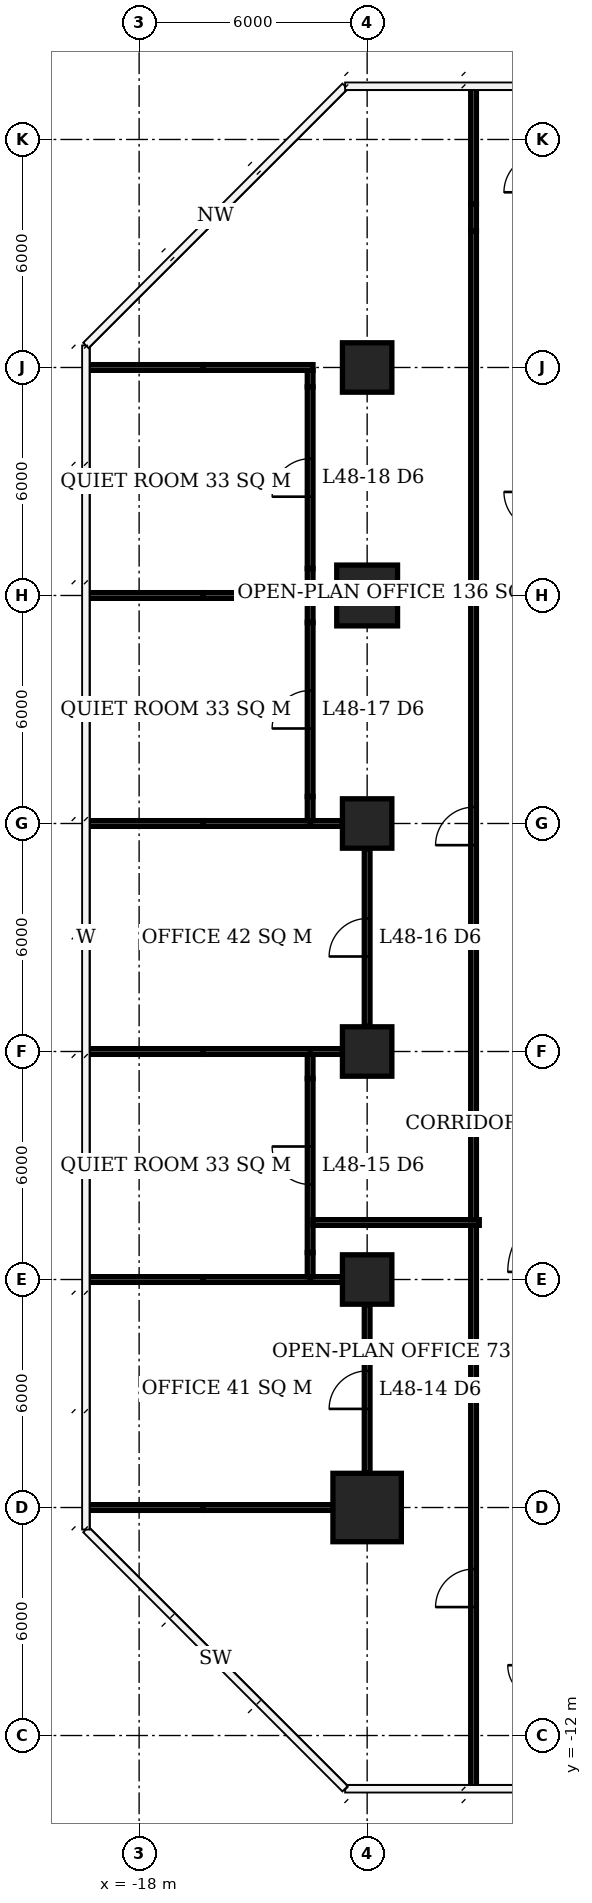
"""IFC4 building model, lengths in metres.
Left out: names, types, materials, properties, quantities, classifications, styles, units other than length and angle.
Written with IfcOpenShell. Run it as: python <this file> out.ifc"""

import sys

from ifc_helpers import new_model, si_unit, direction, frame, frame_2d, origin, origin_2d, place, context, subcontext, project, spatial, rectangle, extrude, element, fill, save


model = new_model("IFC4")
c1 = context("Model", 3, precision=1e-05, world=origin(), true_north=direction((0.0, 1.0)))
c2 = subcontext(c1, "Body", "Model", "MODEL_VIEW")
j1 = project(units=[si_unit("LENGTHUNIT", "METRE"), si_unit("PLANEANGLEUNIT", "RADIAN")], contexts=[c1])
p1 = place(None, origin())
s1 = spatial("IfcSite", under=j1, at=p1, CompositionType="ELEMENT")
p2 = place(p1, origin())
s2 = spatial("IfcBuilding", under=s1, at=p2, CompositionType="ELEMENT")
p3 = place(p2, frame((0.0, 0.0, 196.7)))
s3 = spatial("IfcBuildingStorey", under=s2, at=p3, CompositionType="ELEMENT", Elevation=196.7)
p4 = place(p3, frame((-12.0, -6.0, 0.0), z_axis=(0.0, 0.0, 1.0), x_axis=(1.0, 0.0, 0.0)))
e1 = element("IfcColumn", 1, at=p4, inside=s3, PredefinedType="COLUMN", context=c2, shape_type="SweptSolid", body=[
    extrude(rectangle(XDim=1.8, YDim=1.8, at=origin_2d()), origin(), (0.0, 0.0, 1.0), 3.9),
])
for number, where, z_axis, x_axis in (
    (2, (-12.0, 0.0, 0.0), (0.0, 0.0, 1.0), (1.0, 0.0, 0.0)),
    (3, (-12.0, 6.0, 0.0), (0.0, 0.0, 1.0), (1.0, 0.0, 0.0)),
    (4, (-12.0, 12.0, 0.0), (0.0, 0.0, 1.0), (1.0, 0.0, 0.0)),
):
    element("IfcColumn", number, at=place(p3, frame(where, z_axis=z_axis, x_axis=x_axis)), inside=s3, PredefinedType="COLUMN", context=c2, shape_type="SweptSolid", body=[
        extrude(rectangle(XDim=1.3, YDim=1.3, at=origin_2d()), origin(), (0.0, 0.0, 1.0), 3.9),
    ])
p5 = place(p3, frame((-12.0, 18.0, 0.0), z_axis=(0.0, 0.0, 1.0), x_axis=(1.0, 0.0, 0.0)))
e5 = element("IfcColumn", 5, at=p5, inside=s3, PredefinedType="COLUMN", context=c2, shape_type="SweptSolid", body=[
    extrude(rectangle(XDim=1.6, YDim=1.6, at=origin_2d()), origin(), (0.0, 0.0, 1.0), 3.9),
])
p6 = place(p3, frame((-12.0, 24.0, 0.0), z_axis=(0.0, 0.0, 1.0), x_axis=(1.0, 0.0, 0.0)))
e6 = element("IfcColumn", 6, at=p6, inside=s3, PredefinedType="COLUMN", context=c2, shape_type="SweptSolid", body=[
    extrude(rectangle(XDim=1.3, YDim=1.3, at=origin_2d()), origin(), (0.0, 0.0, 1.0), 3.9),
])
p7 = place(p3, frame((-19.4, -6.0, 0.0), z_axis=(0.0, 0.0, 1.0), x_axis=(1.0, 0.0, 0.0)))
e7 = element("IfcWall", 7, at=p7, inside=s3, PredefinedType="PARTITIONING", context=c2, shape_type="SweptSolid", body=[
    extrude(rectangle(XDim=3.09, YDim=0.15, at=frame_2d((1.545, 0.0))), origin(), (0.0, 0.0, 1.0), 3.65),
])
p8 = place(p3, frame((-16.31, -6.0, 0.0), z_axis=(0.0, 0.0, 1.0), x_axis=(1.0, 0.0, 0.0)))
e8 = element("IfcWall", 8, at=p8, inside=s3, PredefinedType="PARTITIONING", context=c2, shape_type="SweptSolid", body=[
    extrude(rectangle(XDim=3.41, YDim=0.15, at=frame_2d((1.705, 0.0))), origin(), (0.0, 0.0, 1.0), 2.65),
])
p9 = place(p3, frame((-19.4, 0.0, 0.0), z_axis=(0.0, 0.0, 1.0), x_axis=(1.0, 0.0, 0.0)))
e9 = element("IfcWall", 9, at=p9, inside=s3, PredefinedType="PARTITIONING", context=c2, shape_type="SweptSolid", body=[
    extrude(rectangle(XDim=3.09, YDim=0.15, at=frame_2d((1.545, 0.0))), origin(), (0.0, 0.0, 1.0), 3.65),
])
p10 = place(p3, frame((-16.31, 0.0, 0.0), z_axis=(0.0, 0.0, 1.0), x_axis=(1.0, 0.0, 0.0)))
e10 = element("IfcWall", 10, at=p10, inside=s3, PredefinedType="PARTITIONING", context=c2, shape_type="SweptSolid", body=[
    extrude(rectangle(XDim=2.885, YDim=0.15, at=frame_2d((1.442, 0.0))), origin(), (0.0, 0.0, 1.0), 2.65),
])
p11 = place(p3, frame((-13.5, 0.0, 0.0), z_axis=(0.0, 0.0, 1.0), x_axis=(1.0, 0.0, 0.0)))
e11 = element("IfcWall", 11, at=p11, inside=s3, PredefinedType="PARTITIONING", context=c2, shape_type="SweptSolid", body=[
    extrude(rectangle(XDim=0.85, YDim=0.15, at=frame_2d((0.425, 0.0))), origin(), (0.0, 0.0, 1.0), 2.65),
])
p12 = place(p3, frame((-19.35, 6.0, 0.0), z_axis=(0.0, 0.0, 1.0), x_axis=(1.0, 0.0, 0.0)))
e12 = element("IfcWall", 12, at=p12, inside=s3, PredefinedType="PARTITIONING", context=c2, shape_type="SweptSolid", body=[
    extrude(rectangle(XDim=3.04, YDim=0.15, at=frame_2d((1.52, 0.0))), origin(), (0.0, 0.0, 1.0), 3.65),
])
p13 = place(p3, frame((-16.31, 6.0, 0.0), z_axis=(0.0, 0.0, 1.0), x_axis=(1.0, 0.0, 0.0)))
e13 = element("IfcWall", 13, at=p13, inside=s3, PredefinedType="PARTITIONING", context=c2, shape_type="SweptSolid", body=[
    extrude(rectangle(XDim=2.885, YDim=0.15, at=frame_2d((1.442, 0.0))), origin(), (0.0, 0.0, 1.0), 2.65),
])
p14 = place(p3, frame((-13.5, 6.0, 0.0), z_axis=(0.0, 0.0, 1.0), x_axis=(1.0, 0.0, 0.0)))
e14 = element("IfcWall", 14, at=p14, inside=s3, PredefinedType="PARTITIONING", context=c2, shape_type="SweptSolid", body=[
    extrude(rectangle(XDim=0.85, YDim=0.15, at=frame_2d((0.425, 0.0))), origin(), (0.0, 0.0, 1.0), 2.65),
])
p15 = place(p3, frame((-19.35, 12.0, 0.0), z_axis=(0.0, 0.0, 1.0), x_axis=(1.0, 0.0, 0.0)))
e15 = element("IfcWall", 15, at=p15, inside=s3, PredefinedType="PARTITIONING", context=c2, shape_type="SweptSolid", body=[
    extrude(rectangle(XDim=3.04, YDim=0.15, at=frame_2d((1.52, 0.0))), origin(), (0.0, 0.0, 1.0), 3.65),
])
p16 = place(p3, frame((-16.31, 12.0, 0.0), z_axis=(0.0, 0.0, 1.0), x_axis=(1.0, 0.0, 0.0)))
e16 = element("IfcWall", 16, at=p16, inside=s3, PredefinedType="PARTITIONING", context=c2, shape_type="SweptSolid", body=[
    extrude(rectangle(XDim=2.885, YDim=0.15, at=frame_2d((1.442, 0.0))), origin(), (0.0, 0.0, 1.0), 2.65),
])
p17 = place(p3, frame((-13.5, 12.0, 0.0), z_axis=(0.0, 0.0, 1.0), x_axis=(1.0, 0.0, 0.0)))
e17 = element("IfcWall", 17, at=p17, inside=s3, PredefinedType="PARTITIONING", context=c2, shape_type="SweptSolid", body=[
    extrude(rectangle(XDim=0.85, YDim=0.15, at=frame_2d((0.425, 0.0))), origin(), (0.0, 0.0, 1.0), 2.65),
])
p18 = place(p3, frame((-19.4, 18.0, 0.0), z_axis=(0.0, 0.0, 1.0), x_axis=(1.0, 0.0, 0.0)))
e18 = element("IfcWall", 18, at=p18, inside=s3, PredefinedType="PARTITIONING", context=c2, shape_type="SweptSolid", body=[
    extrude(rectangle(XDim=3.09, YDim=0.15, at=frame_2d((1.545, 0.0))), origin(), (0.0, 0.0, 1.0), 3.65),
])
p19 = place(p3, frame((-16.31, 18.0, 0.0), z_axis=(0.0, 0.0, 1.0), x_axis=(1.0, 0.0, 0.0)))
e19 = element("IfcWall", 19, at=p19, inside=s3, PredefinedType="PARTITIONING", context=c2, shape_type="SweptSolid", body=[
    extrude(rectangle(XDim=2.96, YDim=0.15, at=frame_2d((1.48, 0.0))), origin(), (0.0, 0.0, 1.0), 2.65),
])
p20 = place(p3, frame((-19.4, 24.0, 0.0), z_axis=(0.0, 0.0, 1.0), x_axis=(1.0, 0.0, 0.0)))
e20 = element("IfcWall", 20, at=p20, inside=s3, PredefinedType="PARTITIONING", context=c2, shape_type="SweptSolid", body=[
    extrude(rectangle(XDim=3.09, YDim=0.15, at=frame_2d((1.545, 0.0))), origin(), (0.0, 0.0, 1.0), 3.65),
])
p21 = place(p3, frame((-16.31, 24.0, 0.0), z_axis=(0.0, 0.0, 1.0), x_axis=(1.0, 0.0, 0.0)))
e21 = element("IfcWall", 21, at=p21, inside=s3, PredefinedType="PARTITIONING", context=c2, shape_type="SweptSolid", body=[
    extrude(rectangle(XDim=2.885, YDim=0.15, at=frame_2d((1.442, 0.0))), origin(), (0.0, 0.0, 1.0), 2.65),
])
p22 = place(p3, frame((-13.5, 0.075, 0.0), z_axis=(0.0, 0.0, 1.0), x_axis=(0.0, 1.0, 0.0)))
e22 = element("IfcWall", 22, at=p22, inside=s3, PredefinedType="PARTITIONING", context=c2, shape_type="SweptSolid", body=[
    extrude(rectangle(XDim=0.635, YDim=0.15, at=frame_2d((0.317, 0.0))), origin(), (0.0, 0.0, 1.0), 2.65),
])
p23 = place(p3, frame((-13.5, 0.71, 0.0), z_axis=(0.0, 0.0, 1.0), x_axis=(0.0, 1.0, 0.0)))
e23 = element("IfcWall", 23, at=p23, inside=s3, PredefinedType="PARTITIONING", context=c2, shape_type="SweptSolid", body=[
    extrude(rectangle(XDim=4.58, YDim=0.15, at=frame_2d((2.29, 0.0))), origin(), (0.0, 0.0, 1.0), 3.65),
])
p24 = place(p23, frame((1.79, 0.0, 0.0)))
e24 = element("IfcOpeningElement", 24, at=p24, cuts=e23, PredefinedType="OPENING", context=c2, shape_type="SweptSolid", body=[
    extrude(rectangle(XDim=1.0, YDim=2.1, at=frame_2d((0.5, 1.05))), frame((0.0, 0.085, 0.0), z_axis=(0.0, -1.0, 0.0), x_axis=(1.0, 0.0, 0.0)), (0.0, 0.0, 1.0), 0.17),
])
for number, where, z_axis, x_axis in (
    (25, (-13.5, 5.29, 0.0), (0.0, 0.0, 1.0), (0.0, 1.0, 0.0)),
    (26, (-13.5, 12.075, 0.0), (0.0, 0.0, 1.0), (0.0, 1.0, 0.0)),
):
    element("IfcWall", number, at=place(p3, frame(where, z_axis=z_axis, x_axis=x_axis)), inside=s3, PredefinedType="PARTITIONING", context=c2, shape_type="SweptSolid", body=[
        extrude(rectangle(XDim=0.635, YDim=0.15, at=frame_2d((0.317, 0.0))), origin(), (0.0, 0.0, 1.0), 2.65),
    ])
p25 = place(p3, frame((-13.5, 12.71, 0.0), z_axis=(0.0, 0.0, 1.0), x_axis=(0.0, 1.0, 0.0)))
e27 = element("IfcWall", 27, at=p25, inside=s3, PredefinedType="PARTITIONING", context=c2, shape_type="SweptSolid", body=[
    extrude(rectangle(XDim=4.58, YDim=0.15, at=frame_2d((2.29, 0.0))), origin(), (0.0, 0.0, 1.0), 3.65),
])
p26 = place(p25, frame((1.79, 0.0, 0.0)))
e28 = element("IfcOpeningElement", 28, at=p26, cuts=e27, PredefinedType="OPENING", context=c2, shape_type="SweptSolid", body=[
    extrude(rectangle(XDim=1.0, YDim=2.1, at=frame_2d((0.5, 1.05))), frame((0.0, 0.085, 0.0), z_axis=(0.0, -1.0, 0.0), x_axis=(1.0, 0.0, 0.0)), (0.0, 0.0, 1.0), 0.17),
])
for number, where, z_axis, x_axis in (
    (29, (-13.5, 17.29, 0.0), (0.0, 0.0, 1.0), (0.0, 1.0, 0.0)),
    (30, (-13.5, 18.075, 0.0), (0.0, 0.0, 1.0), (0.0, 1.0, 0.0)),
):
    element("IfcWall", number, at=place(p3, frame(where, z_axis=z_axis, x_axis=x_axis)), inside=s3, PredefinedType="PARTITIONING", context=c2, shape_type="SweptSolid", body=[
        extrude(rectangle(XDim=0.635, YDim=0.15, at=frame_2d((0.317, 0.0))), origin(), (0.0, 0.0, 1.0), 2.65),
    ])
p27 = place(p3, frame((-13.5, 18.71, 0.0), z_axis=(0.0, 0.0, 1.0), x_axis=(0.0, 1.0, 0.0)))
e31 = element("IfcWall", 31, at=p27, inside=s3, PredefinedType="PARTITIONING", context=c2, shape_type="SweptSolid", body=[
    extrude(rectangle(XDim=4.78, YDim=0.15, at=frame_2d((2.39, 0.0))), origin(), (0.0, 0.0, 1.0), 3.65),
])
p28 = place(p27, frame((1.89, 0.0, 0.0)))
e32 = element("IfcOpeningElement", 32, at=p28, cuts=e31, PredefinedType="OPENING", context=c2, shape_type="SweptSolid", body=[
    extrude(rectangle(XDim=1.0, YDim=2.1, at=frame_2d((0.5, 1.05))), frame((0.0, 0.085, 0.0), z_axis=(0.0, -1.0, 0.0), x_axis=(1.0, 0.0, 0.0)), (0.0, 0.0, 1.0), 0.17),
])
p29 = place(p3, frame((-13.5, 23.49, 0.0), z_axis=(0.0, 0.0, 1.0), x_axis=(0.0, 1.0, 0.0)))
e33 = element("IfcWall", 33, at=p29, inside=s3, PredefinedType="PARTITIONING", context=c2, shape_type="SweptSolid", body=[
    extrude(rectangle(XDim=0.435, YDim=0.15, at=frame_2d((0.218, 0.0))), origin(), (0.0, 0.0, 1.0), 2.65),
])
p30 = place(p3, frame((-12.0, -5.1, 0.0), z_axis=(0.0, 0.0, 1.0), x_axis=(0.0, 1.0, 0.0)))
e34 = element("IfcWall", 34, at=p30, inside=s3, PredefinedType="PARTITIONING", context=c2, shape_type="SweptSolid", body=[
    extrude(rectangle(XDim=4.44, YDim=0.15, at=frame_2d((2.22, 0.0))), origin(), (0.0, 0.0, 1.0), 3.65),
])
p31 = place(p30, frame((1.695, 0.0, 0.0)))
e35 = element("IfcOpeningElement", 35, at=p31, cuts=e34, PredefinedType="OPENING", context=c2, shape_type="SweptSolid", body=[
    extrude(rectangle(XDim=1.0, YDim=2.1, at=frame_2d((0.5, 1.05))), frame((0.0, 0.085, 0.0), z_axis=(0.0, -1.0, 0.0), x_axis=(1.0, 0.0, 0.0)), (0.0, 0.0, 1.0), 0.17),
])
p32 = place(p3, frame((-12.0, 6.66, 0.0), z_axis=(0.0, 0.0, 1.0), x_axis=(0.0, 1.0, 0.0)))
e36 = element("IfcWall", 36, at=p32, inside=s3, PredefinedType="PARTITIONING", context=c2, shape_type="SweptSolid", body=[
    extrude(rectangle(XDim=4.68, YDim=0.15, at=frame_2d((2.34, 0.0))), origin(), (0.0, 0.0, 1.0), 3.65),
])
p33 = place(p32, frame((1.84, 0.0, 0.0)))
e37 = element("IfcOpeningElement", 37, at=p33, cuts=e36, PredefinedType="OPENING", context=c2, shape_type="SweptSolid", body=[
    extrude(rectangle(XDim=1.0, YDim=2.1, at=frame_2d((0.5, 1.05))), frame((0.0, 0.085, 0.0), z_axis=(0.0, -1.0, 0.0), x_axis=(1.0, 0.0, 0.0)), (0.0, 0.0, 1.0), 0.17),
])
p34 = place(p3, frame((-13.425, 1.5, 0.0), z_axis=(0.0, 0.0, 1.0), x_axis=(1.0, 0.0, 0.0)))
e38 = element("IfcWall", 38, at=p34, inside=s3, PredefinedType="PARTITIONING", context=c2, shape_type="SweptSolid", body=[
    extrude(rectangle(XDim=4.375, YDim=0.15, at=frame_2d((2.188, 0.0))), origin(), (0.0, 0.0, 1.0), 3.65),
])
p35 = place(p3, frame((-9.2, -13.4, 0.0), z_axis=(0.0, 0.0, 1.0), x_axis=(0.0, 1.0, 0.0)))
e39 = element("IfcWall", 39, at=p35, inside=s3, PredefinedType="PARTITIONING", context=c2, shape_type="SweptSolid", body=[
    extrude(rectangle(XDim=14.825, YDim=0.15, at=frame_2d((7.413, 0.0))), origin(), (0.0, 0.0, 1.0), 3.65),
])
p36 = place(p35, frame((4.78, 0.0, 0.0)))
e40 = element("IfcOpeningElement", 40, at=p36, cuts=e39, PredefinedType="OPENING", context=c2, shape_type="SweptSolid", body=[
    extrude(rectangle(XDim=1.0, YDim=2.1, at=frame_2d((0.5, 1.05))), frame((0.0, 0.085, 0.0), z_axis=(0.0, -1.0, 0.0), x_axis=(1.0, 0.0, 0.0)), (0.0, 0.0, 1.0), 0.17),
])
p37 = place(p3, frame((-9.2, 1.575, 0.0), z_axis=(0.0, 0.0, 1.0), x_axis=(0.0, 1.0, 0.0)))
e41 = element("IfcWall", 41, at=p37, inside=s3, PredefinedType="PARTITIONING", context=c2, shape_type="SweptSolid", body=[
    extrude(rectangle(XDim=26.015, YDim=0.15, at=frame_2d((13.008, 0.0))), origin(), (0.0, 0.0, 1.0), 3.65),
])
p38 = place(p37, frame((9.855, 0.0, 0.0)))
e42 = element("IfcOpeningElement", 42, at=p38, cuts=e41, PredefinedType="OPENING", context=c2, shape_type="SweptSolid", body=[
    extrude(rectangle(XDim=1.0, YDim=2.1, at=frame_2d((0.5, 1.05))), frame((0.0, 0.085, 0.0), z_axis=(0.0, -1.0, 0.0), x_axis=(1.0, 0.0, 0.0)), (0.0, 0.0, 1.0), 0.17),
])
p39 = place(p3, frame((-9.2, 27.59, 0.0), z_axis=(0.0, 0.0, 1.0), x_axis=(0.0, 1.0, 0.0)))
e43 = element("IfcWall", 43, at=p39, inside=s3, PredefinedType="PARTITIONING", context=c2, shape_type="SweptSolid", body=[
    extrude(rectangle(XDim=0.72, YDim=0.15, at=frame_2d((0.36, 0.0))), origin(), (0.0, 0.0, 1.0), 2.65),
])
p40 = place(p3, frame((-9.2, 28.31, 0.0), z_axis=(0.0, 0.0, 1.0), x_axis=(0.0, 1.0, 0.0)))
e44 = element("IfcWall", 44, at=p40, inside=s3, PredefinedType="PARTITIONING", context=c2, shape_type="SweptSolid", body=[
    extrude(rectangle(XDim=3.09, YDim=0.15, at=frame_2d((1.545, 0.0))), origin(), (0.0, 0.0, 1.0), 3.65),
])
p41 = place(p31, origin())
e45 = element("IfcDoor", 45, at=p41, inside=s3, OperationType="SINGLE_SWING_LEFT", PredefinedType="DOOR", context=c2, shape_type="SweptSolid", body=[
    extrude(rectangle(XDim=1.0, YDim=2.1, at=frame_2d((0.5, 1.05))), frame((0.0, 0.025, 0.0), z_axis=(0.0, -1.0, 0.0), x_axis=(1.0, 0.0, 0.0)), (0.0, 0.0, 1.0), 0.05),
])
fill(e35, e45)
p42 = place(p24, origin())
e46 = element("IfcDoor", 46, at=p42, inside=s3, OperationType="SINGLE_SWING_RIGHT", PredefinedType="DOOR", context=c2, shape_type="SweptSolid", body=[
    extrude(rectangle(XDim=1.0, YDim=2.1, at=frame_2d((0.5, 1.05))), frame((0.0, 0.025, 0.0), z_axis=(0.0, -1.0, 0.0), x_axis=(1.0, 0.0, 0.0)), (0.0, 0.0, 1.0), 0.05),
])
fill(e24, e46)
p43 = place(p33, origin())
e47 = element("IfcDoor", 47, at=p43, inside=s3, OperationType="SINGLE_SWING_LEFT", PredefinedType="DOOR", context=c2, shape_type="SweptSolid", body=[
    extrude(rectangle(XDim=1.0, YDim=2.1, at=frame_2d((0.5, 1.05))), frame((0.0, 0.025, 0.0), z_axis=(0.0, -1.0, 0.0), x_axis=(1.0, 0.0, 0.0)), (0.0, 0.0, 1.0), 0.05),
])
fill(e37, e47)
p44 = place(p26, origin())
e48 = element("IfcDoor", 48, at=p44, inside=s3, OperationType="SINGLE_SWING_LEFT", PredefinedType="DOOR", context=c2, shape_type="SweptSolid", body=[
    extrude(rectangle(XDim=1.0, YDim=2.1, at=frame_2d((0.5, 1.05))), frame((0.0, 0.025, 0.0), z_axis=(0.0, -1.0, 0.0), x_axis=(1.0, 0.0, 0.0)), (0.0, 0.0, 1.0), 0.05),
])
fill(e28, e48)
p45 = place(p28, origin())
e49 = element("IfcDoor", 49, at=p45, inside=s3, OperationType="SINGLE_SWING_LEFT", PredefinedType="DOOR", context=c2, shape_type="SweptSolid", body=[
    extrude(rectangle(XDim=1.0, YDim=2.1, at=frame_2d((0.5, 1.05))), frame((0.0, 0.025, 0.0), z_axis=(0.0, -1.0, 0.0), x_axis=(1.0, 0.0, 0.0)), (0.0, 0.0, 1.0), 0.05),
])
fill(e32, e49)
p46 = place(p36, origin())
e50 = element("IfcDoor", 50, at=p46, inside=s3, OperationType="SINGLE_SWING_LEFT", PredefinedType="DOOR", context=c2, shape_type="SweptSolid", body=[
    extrude(rectangle(XDim=1.0, YDim=2.1, at=frame_2d((0.5, 1.05))), frame((0.0, 0.025, 0.0), z_axis=(0.0, -1.0, 0.0), x_axis=(1.0, 0.0, 0.0)), (0.0, 0.0, 1.0), 0.05),
])
fill(e40, e50)
p47 = place(p38, origin())
e51 = element("IfcDoor", 51, at=p47, inside=s3, OperationType="SINGLE_SWING_LEFT", PredefinedType="DOOR", context=c2, shape_type="SweptSolid", body=[
    extrude(rectangle(XDim=1.0, YDim=2.1, at=frame_2d((0.5, 1.05))), frame((0.0, 0.025, 0.0), z_axis=(0.0, -1.0, 0.0), x_axis=(1.0, 0.0, 0.0)), (0.0, 0.0, 1.0), 0.05),
])
fill(e42, e51)
save(model, sys.argv[1])
